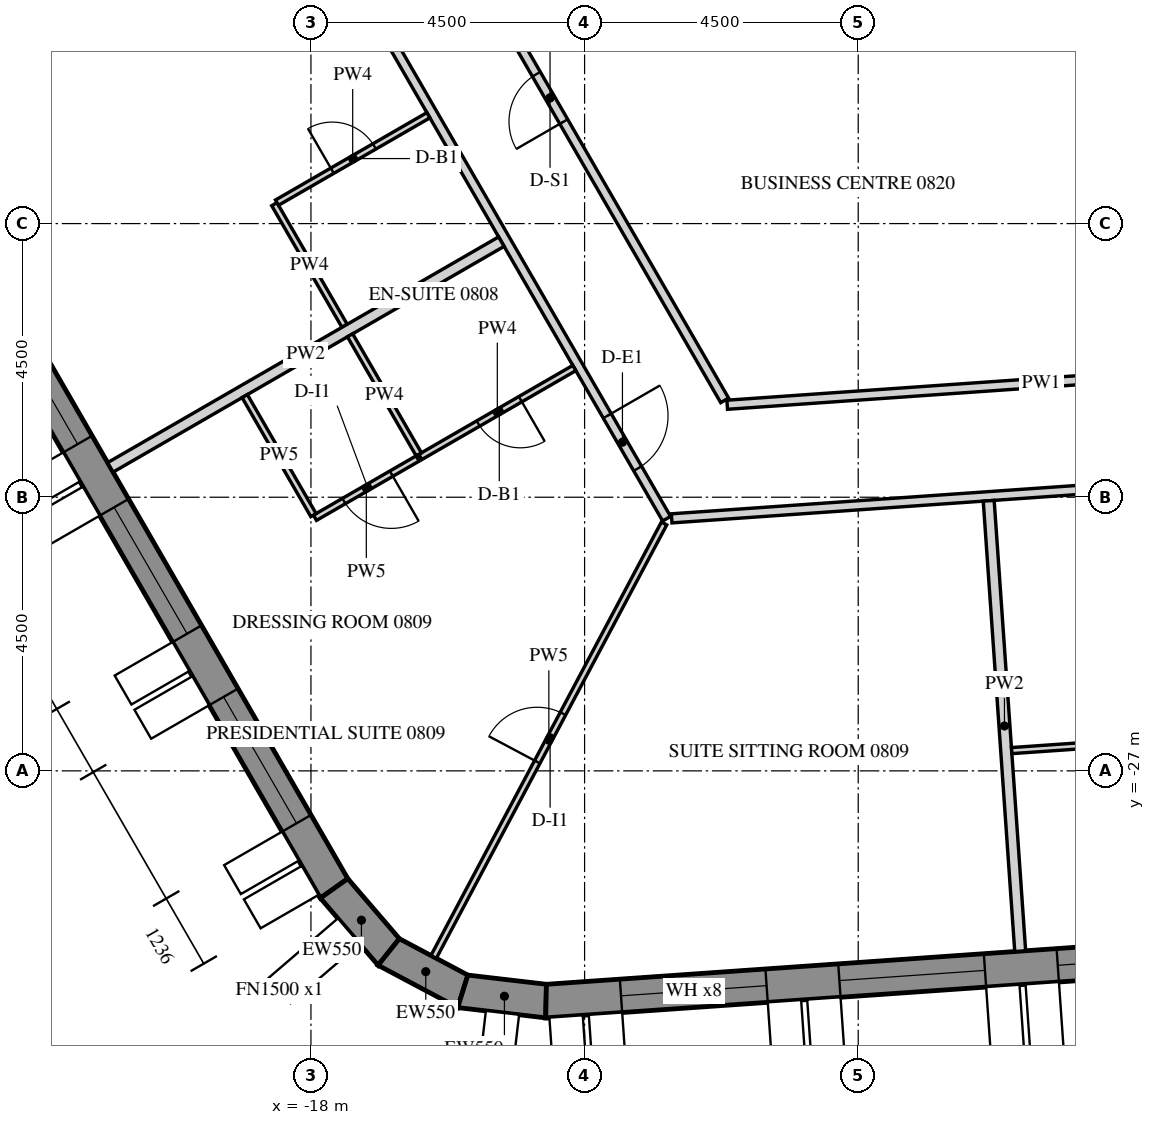
"""IFC4 building model, lengths in metres.
Left out: names, types, materials, properties, quantities, classifications, styles, units other than length and angle.
Written with IfcOpenShell. Run it as: python <this file> out.ifc"""

import sys

from ifc_helpers import new_model, si_unit, direction, frame, frame_2d, origin, place, context, subcontext, project, spatial, polyline, rectangle, outline, extrude, element, fill, save


model = new_model("IFC4")
c1 = context("Model", 3, precision=1e-05, world=origin(), true_north=direction((0.0, 1.0)))
c2 = subcontext(c1, "Body", "Model", "MODEL_VIEW")
j1 = project(units=[si_unit("LENGTHUNIT", "METRE"), si_unit("PLANEANGLEUNIT", "RADIAN")], contexts=[c1])
p1 = place(None, origin())
s1 = spatial("IfcSite", under=j1, at=p1, CompositionType="ELEMENT")
p2 = place(p1, origin())
s2 = spatial("IfcBuilding", under=s1, at=p2, CompositionType="ELEMENT")
p3 = place(p2, frame((0.0, 0.0, 111.6)))
s3 = spatial("IfcBuildingStorey", under=s2, at=p3, CompositionType="ELEMENT", Elevation=111.6)
p4 = place(p3, frame((-32.655, -2.89, -0.15), z_axis=(0.0, 0.0, 1.0), x_axis=(0.499997711317, -0.866026725152, 0.0)))
e1 = element("IfcWall", 1, at=p4, inside=s3, PredefinedType="SOLIDWALL", context=c2, shape_type="SweptSolid", body=[
    extrude(outline(polyline([(-0.022, -0.275), (30.097, -0.275), (30.045, 0.275), (0.022, 0.275), (-0.022, -0.275)])), origin(), (0.0, 0.0, 1.0), 3.9),
])
p5 = place(p4, frame((1.236, 0.0, 1.05)))
e2 = element("IfcOpeningElement", 2, at=p5, cuts=e1, PredefinedType="OPENING", context=c2, shape_type="SweptSolid", body=[
    extrude(rectangle(XDim=2.4, YDim=2.4, at=frame_2d((1.2, 1.2))), frame((0.0, 0.285, 0.0), z_axis=(0.0, -1.0, 0.0), x_axis=(1.0, 0.0, 0.0)), (0.0, 0.0, 1.0), 0.57),
])
p6 = place(p4, frame((4.835, 0.0, 1.05)))
e3 = element("IfcOpeningElement", 3, at=p6, cuts=e1, PredefinedType="OPENING", context=c2, shape_type="SweptSolid", body=[
    extrude(rectangle(XDim=2.4, YDim=2.4, at=frame_2d((1.2, 1.2))), frame((0.0, 0.285, 0.0), z_axis=(0.0, -1.0, 0.0), x_axis=(1.0, 0.0, 0.0)), (0.0, 0.0, 1.0), 0.57),
])
p7 = place(p4, frame((8.436, 0.0, 1.05)))
e4 = element("IfcOpeningElement", 4, at=p7, cuts=e1, PredefinedType="OPENING", context=c2, shape_type="SweptSolid", body=[
    extrude(rectangle(XDim=2.4, YDim=2.4, at=frame_2d((1.2, 1.2))), frame((0.0, 0.285, 0.0), z_axis=(0.0, -1.0, 0.0), x_axis=(1.0, 0.0, 0.0)), (0.0, 0.0, 1.0), 0.57),
])
p8 = place(p4, frame((12.035, 0.0, 1.05)))
e5 = element("IfcOpeningElement", 5, at=p8, cuts=e1, PredefinedType="OPENING", context=c2, shape_type="SweptSolid", body=[
    extrude(rectangle(XDim=2.4, YDim=2.4, at=frame_2d((1.2, 1.2))), frame((0.0, 0.285, 0.0), z_axis=(0.0, -1.0, 0.0), x_axis=(1.0, 0.0, 0.0)), (0.0, 0.0, 1.0), 0.57),
])
p9 = place(p4, frame((15.635, 0.0, 1.05)))
e6 = element("IfcOpeningElement", 6, at=p9, cuts=e1, PredefinedType="OPENING", context=c2, shape_type="SweptSolid", body=[
    extrude(rectangle(XDim=2.4, YDim=2.4, at=frame_2d((1.2, 1.2))), frame((0.0, 0.285, 0.0), z_axis=(0.0, -1.0, 0.0), x_axis=(1.0, 0.0, 0.0)), (0.0, 0.0, 1.0), 0.57),
])
p10 = place(p4, frame((19.236, 0.0, 1.05)))
e7 = element("IfcOpeningElement", 7, at=p10, cuts=e1, PredefinedType="OPENING", context=c2, shape_type="SweptSolid", body=[
    extrude(rectangle(XDim=2.4, YDim=2.4, at=frame_2d((1.2, 1.2))), frame((0.0, 0.285, 0.0), z_axis=(0.0, -1.0, 0.0), x_axis=(1.0, 0.0, 0.0)), (0.0, 0.0, 1.0), 0.57),
])
p11 = place(p4, frame((22.835, 0.0, 1.05)))
e8 = element("IfcOpeningElement", 8, at=p11, cuts=e1, PredefinedType="OPENING", context=c2, shape_type="SweptSolid", body=[
    extrude(rectangle(XDim=2.4, YDim=2.4, at=frame_2d((1.2, 1.2))), frame((0.0, 0.285, 0.0), z_axis=(0.0, -1.0, 0.0), x_axis=(1.0, 0.0, 0.0)), (0.0, 0.0, 1.0), 0.57),
])
p12 = place(p4, frame((26.436, 0.0, 1.05)))
e9 = element("IfcOpeningElement", 9, at=p12, cuts=e1, PredefinedType="OPENING", context=c2, shape_type="SweptSolid", body=[
    extrude(rectangle(XDim=2.4, YDim=2.4, at=frame_2d((1.2, 1.2))), frame((0.0, 0.285, 0.0), z_axis=(0.0, -1.0, 0.0), x_axis=(1.0, 0.0, 0.0)), (0.0, 0.0, 1.0), 0.57),
])
p13 = place(p3, frame((-17.619, -28.932, -0.15), z_axis=(0.0, 0.0, 1.0), x_axis=(0.651621950847, -0.758543890078, 0.0)))
e10 = element("IfcWall", 10, at=p13, inside=s3, PredefinedType="SOLIDWALL", context=c2, shape_type="SweptSolid", body=[
    extrude(outline(polyline([(-0.026, -0.275), (1.431, -0.275), (1.327, 0.275), (0.026, 0.275), (-0.026, -0.275)])), origin(), (0.0, 0.0, 1.0), 3.9),
])
p14 = place(p3, frame((-16.721, -29.979, -0.15), z_axis=(0.0, 0.0, 1.0), x_axis=(0.882994189209, -0.469383917304, 0.0)))
e11 = element("IfcWall", 11, at=p14, inside=s3, PredefinedType="SOLIDWALL", context=c2, shape_type="SweptSolid", body=[
    extrude(outline(polyline([(-0.052, -0.275), (1.431, -0.275), (1.327, 0.275), (0.052, 0.275), (-0.052, -0.275)])), origin(), (0.0, 0.0, 1.0), 3.9),
])
p15 = place(p3, frame((-15.503, -30.626, -0.15), z_axis=(0.0, 0.0, 1.0), x_axis=(0.993232537394, -0.11614269956, 0.0)))
e12 = element("IfcWall", 12, at=p15, inside=s3, PredefinedType="SOLIDWALL", context=c2, shape_type="SweptSolid", body=[
    extrude(outline(polyline([(-0.052, -0.275), (1.405, -0.275), (1.353, 0.275), (0.052, 0.275), (-0.052, -0.275)])), origin(), (0.0, 0.0, 1.0), 3.9),
])
p16 = place(p3, frame((-14.134, -30.786, -0.15), z_axis=(0.0, 0.0, 1.0), x_axis=(0.997564037441, 0.069756657061, 0.0)))
e13 = element("IfcWall", 13, at=p16, inside=s3, PredefinedType="SOLIDWALL", context=c2, shape_type="SweptSolid", body=[
    extrude(outline(polyline([(-0.026, -0.275), (30.094, -0.275), (30.049, 0.275), (0.026, 0.275), (-0.026, -0.275)])), origin(), (0.0, 0.0, 1.0), 3.9),
])
p17 = place(p16, frame((1.236, 0.0, 1.05)))
e14 = element("IfcOpeningElement", 14, at=p17, cuts=e13, PredefinedType="OPENING", context=c2, shape_type="SweptSolid", body=[
    extrude(rectangle(XDim=2.4, YDim=2.4, at=frame_2d((1.2, 1.2))), frame((0.0, 0.285, 0.0), z_axis=(0.0, -1.0, 0.0), x_axis=(1.0, 0.0, 0.0)), (0.0, 0.0, 1.0), 0.57),
])
p18 = place(p16, frame((4.835, 0.0, 1.05)))
e15 = element("IfcOpeningElement", 15, at=p18, cuts=e13, PredefinedType="OPENING", context=c2, shape_type="SweptSolid", body=[
    extrude(rectangle(XDim=2.4, YDim=2.4, at=frame_2d((1.2, 1.2))), frame((0.0, 0.285, 0.0), z_axis=(0.0, -1.0, 0.0), x_axis=(1.0, 0.0, 0.0)), (0.0, 0.0, 1.0), 0.57),
])
p19 = place(p16, frame((8.436, 0.0, 1.05)))
e16 = element("IfcOpeningElement", 16, at=p19, cuts=e13, PredefinedType="OPENING", context=c2, shape_type="SweptSolid", body=[
    extrude(rectangle(XDim=2.4, YDim=2.4, at=frame_2d((1.2, 1.2))), frame((0.0, 0.285, 0.0), z_axis=(0.0, -1.0, 0.0), x_axis=(1.0, 0.0, 0.0)), (0.0, 0.0, 1.0), 0.57),
])
p20 = place(p16, frame((12.035, 0.0, 1.05)))
e17 = element("IfcOpeningElement", 17, at=p20, cuts=e13, PredefinedType="OPENING", context=c2, shape_type="SweptSolid", body=[
    extrude(rectangle(XDim=2.4, YDim=2.4, at=frame_2d((1.2, 1.2))), frame((0.0, 0.285, 0.0), z_axis=(0.0, -1.0, 0.0), x_axis=(1.0, 0.0, 0.0)), (0.0, 0.0, 1.0), 0.57),
])
p21 = place(p16, frame((15.635, 0.0, 1.05)))
e18 = element("IfcOpeningElement", 18, at=p21, cuts=e13, PredefinedType="OPENING", context=c2, shape_type="SweptSolid", body=[
    extrude(rectangle(XDim=2.4, YDim=2.4, at=frame_2d((1.2, 1.2))), frame((0.0, 0.285, 0.0), z_axis=(0.0, -1.0, 0.0), x_axis=(1.0, 0.0, 0.0)), (0.0, 0.0, 1.0), 0.57),
])
p22 = place(p16, frame((19.236, 0.0, 1.05)))
e19 = element("IfcOpeningElement", 19, at=p22, cuts=e13, PredefinedType="OPENING", context=c2, shape_type="SweptSolid", body=[
    extrude(rectangle(XDim=2.4, YDim=2.4, at=frame_2d((1.2, 1.2))), frame((0.0, 0.285, 0.0), z_axis=(0.0, -1.0, 0.0), x_axis=(1.0, 0.0, 0.0)), (0.0, 0.0, 1.0), 0.57),
])
p23 = place(p16, frame((22.835, 0.0, 1.05)))
e20 = element("IfcOpeningElement", 20, at=p23, cuts=e13, PredefinedType="OPENING", context=c2, shape_type="SweptSolid", body=[
    extrude(rectangle(XDim=2.4, YDim=2.4, at=frame_2d((1.2, 1.2))), frame((0.0, 0.285, 0.0), z_axis=(0.0, -1.0, 0.0), x_axis=(1.0, 0.0, 0.0)), (0.0, 0.0, 1.0), 0.57),
])
p24 = place(p16, frame((26.436, 0.0, 1.05)))
e21 = element("IfcOpeningElement", 21, at=p24, cuts=e13, PredefinedType="OPENING", context=c2, shape_type="SweptSolid", body=[
    extrude(rectangle(XDim=2.4, YDim=2.4, at=frame_2d((1.2, 1.2))), frame((0.0, 0.285, 0.0), z_axis=(0.0, -1.0, 0.0), x_axis=(1.0, 0.0, 0.0)), (0.0, 0.0, 1.0), 0.57),
])
p25 = place(p3, frame((-24.09, -2.175, 0.0), z_axis=(0.0, 0.0, 1.0), x_axis=(0.499996832073, -0.86602723278, 0.0)))
e22 = element("IfcWall", 22, at=p25, inside=s3, PredefinedType="PARTITIONING", context=c2, shape_type="SweptSolid", body=[
    extrude(rectangle(XDim=23.877, YDim=0.15, at=frame_2d((11.938, 0.0))), origin(), (0.0, 0.0, 1.0), 2.988),
])
p26 = place(p25, frame((4.643, 0.0, 0.0)))
e23 = element("IfcOpeningElement", 23, at=p26, cuts=e22, PredefinedType="OPENING", context=c2, shape_type="SweptSolid", body=[
    extrude(rectangle(XDim=1.0, YDim=2.1, at=frame_2d((0.5, 1.05))), frame((0.0, 0.085, 0.0), z_axis=(0.0, -1.0, 0.0), x_axis=(1.0, 0.0, 0.0)), (0.0, 0.0, 1.0), 0.17),
])
p27 = place(p25, frame((11.472, 0.0, 0.0)))
e24 = element("IfcOpeningElement", 24, at=p27, cuts=e22, PredefinedType="OPENING", context=c2, shape_type="SweptSolid", body=[
    extrude(rectangle(XDim=1.0, YDim=2.1, at=frame_2d((0.5, 1.05))), frame((0.0, 0.085, 0.0), z_axis=(0.0, -1.0, 0.0), x_axis=(1.0, 0.0, 0.0)), (0.0, 0.0, 1.0), 0.17),
])
p28 = place(p25, frame((21.925, 0.0, 0.0)))
e25 = element("IfcOpeningElement", 25, at=p28, cuts=e22, PredefinedType="OPENING", context=c2, shape_type="SweptSolid", body=[
    extrude(rectangle(XDim=1.0, YDim=2.1, at=frame_2d((0.5, 1.05))), frame((0.0, 0.085, 0.0), z_axis=(0.0, -1.0, 0.0), x_axis=(1.0, 0.0, 0.0)), (0.0, 0.0, 1.0), 0.17),
])
p29 = place(p3, frame((-12.068, -22.847, 0.0), z_axis=(0.0, 0.0, 1.0), x_axis=(0.99756437486, 0.069751831595, 0.0)))
e26 = element("IfcWall", 26, at=p29, inside=s3, PredefinedType="PARTITIONING", context=c2, shape_type="SweptSolid", body=[
    extrude(rectangle(XDim=22.002, YDim=0.15, at=frame_2d((11.001, 0.0))), origin(), (0.0, 0.0, 1.0), 2.988),
])
p30 = place(p29, frame((10.621, 0.0, 0.0)))
e27 = element("IfcOpeningElement", 27, at=p30, cuts=e26, PredefinedType="OPENING", context=c2, shape_type="SweptSolid", body=[
    extrude(rectangle(XDim=1.0, YDim=2.1, at=frame_2d((0.5, 1.05))), frame((0.0, 0.085, 0.0), z_axis=(0.0, -1.0, 0.0), x_axis=(1.0, 0.0, 0.0)), (0.0, 0.0, 1.0), 0.17),
])
p31 = place(p29, frame((20.852, 0.0, 0.0)))
e28 = element("IfcOpeningElement", 28, at=p31, cuts=e26, PredefinedType="OPENING", context=c2, shape_type="SweptSolid", body=[
    extrude(rectangle(XDim=1.0, YDim=2.1, at=frame_2d((0.5, 1.05))), frame((0.0, 0.085, 0.0), z_axis=(0.0, -1.0, 0.0), x_axis=(1.0, 0.0, 0.0)), (0.0, 0.0, 1.0), 0.17),
])
p32 = place(p3, frame((-0.825, -20.257, 0.0), z_axis=(0.0, 0.0, 1.0), x_axis=(-0.9975635143, -0.069764137903, 0.0)))
e29 = element("IfcWall", 29, at=p32, inside=s3, PredefinedType="PARTITIONING", context=c2, shape_type="SweptSolid", body=[
    extrude(rectangle(XDim=10.355, YDim=0.15, at=frame_2d((5.177, 0.0))), origin(), (0.0, 0.0, 1.0), 2.988),
])
p33 = place(p3, frame((-11.197, -20.907, 0.0), z_axis=(0.0, 0.0, 1.0), x_axis=(-0.500004557924, 0.86602277225, 0.0)))
e30 = element("IfcWall", 30, at=p33, inside=s3, PredefinedType="PARTITIONING", context=c2, shape_type="SweptSolid", body=[
    extrude(rectangle(XDim=11.487, YDim=0.15, at=frame_2d((5.743, 0.0))), origin(), (0.0, 0.0, 1.0), 2.988),
])
p34 = place(p33, frame((5.293, 0.0, 0.0)))
e31 = element("IfcOpeningElement", 31, at=p34, cuts=e30, PredefinedType="OPENING", context=c2, shape_type="SweptSolid", body=[
    extrude(rectangle(XDim=0.9, YDim=2.1, at=frame_2d((0.45, 1.05))), frame((0.0, 0.085, 0.0), z_axis=(0.0, -1.0, 0.0), x_axis=(1.0, 0.0, 0.0)), (0.0, 0.0, 1.0), 0.17),
])
p35 = place(p3, frame((-17.447, -19.681, 0.0), z_axis=(0.0, 0.0, 1.0), x_axis=(-0.500015210774, 0.866016621662, 0.0)))
e32 = element("IfcWall", 32, at=p35, inside=s3, PredefinedType="PARTITIONING", context=c2, shape_type="SweptSolid", body=[
    extrude(rectangle(XDim=2.31, YDim=0.1, at=frame_2d((1.155, 0.0))), origin(), (0.0, 0.0, 1.0), 2.988),
])
p36 = place(p3, frame((-18.559, -17.656, 0.0), z_axis=(0.0, 0.0, 1.0), x_axis=(0.866039941686, 0.499974818771, 0.0)))
e33 = element("IfcWall", 33, at=p36, inside=s3, PredefinedType="PARTITIONING", context=c2, shape_type="SweptSolid", body=[
    extrude(rectangle(XDim=2.875, YDim=0.1, at=frame_2d((1.438, 0.0))), origin(), (0.0, 0.0, 1.0), 2.988),
])
p37 = place(p36, frame((1.05, 0.0, 0.0)))
e34 = element("IfcOpeningElement", 34, at=p37, cuts=e33, PredefinedType="OPENING", context=c2, shape_type="SweptSolid", body=[
    extrude(rectangle(XDim=0.8, YDim=2.1, at=frame_2d((0.4, 1.05))), frame((0.0, 0.06, 0.0), z_axis=(0.0, -1.0, 0.0), x_axis=(1.0, 0.0, 0.0)), (0.0, 0.0, 1.0), 0.12),
])
p38 = place(p3, frame((-21.299, -22.009, 0.0), z_axis=(0.0, 0.0, 1.0), x_axis=(0.866014745021, 0.500018461065, 0.0)))
e35 = element("IfcWall", 35, at=p38, inside=s3, PredefinedType="PARTITIONING", context=c2, shape_type="SweptSolid", body=[
    extrude(rectangle(XDim=7.425, YDim=0.18, at=frame_2d((3.712, 0.0))), origin(), (0.0, 0.0, 1.0), 2.988),
])
p39 = place(p3, frame((-13.669, -20.375, 0.0), z_axis=(0.0, 0.0, 1.0), x_axis=(-0.866046596414, -0.499963291492, 0.0)))
e36 = element("IfcWall", 36, at=p39, inside=s3, PredefinedType="PARTITIONING", context=c2, shape_type="SweptSolid", body=[
    extrude(rectangle(XDim=2.925, YDim=0.1, at=frame_2d((1.462, 0.0))), origin(), (0.0, 0.0, 1.0), 2.988),
])
p40 = place(p39, frame((1.025, 0.0, 0.0)))
e37 = element("IfcOpeningElement", 37, at=p40, cuts=e36, PredefinedType="OPENING", context=c2, shape_type="SweptSolid", body=[
    extrude(rectangle(XDim=0.8, YDim=2.1, at=frame_2d((0.4, 1.05))), frame((0.0, 0.06, 0.0), z_axis=(0.0, -1.0, 0.0), x_axis=(1.0, 0.0, 0.0)), (0.0, 0.0, 1.0), 0.12),
])
p41 = place(p3, frame((-16.245, -21.863, 0.0), z_axis=(0.0, 0.0, 1.0), x_axis=(-0.866000020948, -0.500043961785, 0.0)))
e38 = element("IfcWall", 38, at=p41, inside=s3, PredefinedType="PARTITIONING", context=c2, shape_type="SweptSolid", body=[
    extrude(rectangle(XDim=1.95, YDim=0.1, at=frame_2d((0.975, 0.0))), origin(), (0.0, 0.0, 1.0), 2.988),
])
p42 = place(p41, frame((0.5, 0.0, 0.0)))
e39 = element("IfcOpeningElement", 39, at=p42, cuts=e38, PredefinedType="OPENING", context=c2, shape_type="SweptSolid", body=[
    extrude(rectangle(XDim=0.9, YDim=2.1, at=frame_2d((0.45, 1.05))), frame((0.0, 0.06, 0.0), z_axis=(0.0, -1.0, 0.0), x_axis=(1.0, 0.0, 0.0)), (0.0, 0.0, 1.0), 0.12),
])
p43 = place(p3, frame((-17.959, -22.794, 0.0), z_axis=(0.0, 0.0, 1.0), x_axis=(-0.500031020067, 0.8660074936, 0.0)))
e40 = element("IfcWall", 40, at=p43, inside=s3, PredefinedType="PARTITIONING", context=c2, shape_type="SweptSolid", body=[
    extrude(rectangle(XDim=2.26, YDim=0.1, at=frame_2d((1.13, 0.0))), origin(), (0.0, 0.0, 1.0), 2.988),
])
p44 = place(p3, frame((-15.983, -30.059, 0.0), z_axis=(0.0, 0.0, 1.0), x_axis=(0.469476547643, 0.882944942346, 0.0)))
e41 = element("IfcWall", 41, at=p44, inside=s3, PredefinedType="PARTITIONING", context=c2, shape_type="SweptSolid", body=[
    extrude(rectangle(XDim=8.073, YDim=0.1, at=frame_2d((4.037, 0.0))), origin(), (0.0, 0.0, 1.0), 2.988),
])
p45 = place(p44, frame((3.631, 0.0, 0.0)))
e42 = element("IfcOpeningElement", 42, at=p45, cuts=e41, PredefinedType="OPENING", context=c2, shape_type="SweptSolid", body=[
    extrude(rectangle(XDim=0.9, YDim=2.1, at=frame_2d((0.45, 1.05))), frame((0.0, 0.06, 0.0), z_axis=(0.0, -1.0, 0.0), x_axis=(1.0, 0.0, 0.0)), (0.0, 0.0, 1.0), 0.12),
])
p46 = place(p3, frame((-17.357, -19.837, 0.0), z_axis=(0.0, 0.0, 1.0), x_axis=(0.49995000081, -0.866054268906, 0.0)))
e43 = element("IfcWall", 43, at=p46, inside=s3, PredefinedType="PARTITIONING", context=c2, shape_type="SweptSolid", body=[
    extrude(rectangle(XDim=2.26, YDim=0.1, at=frame_2d((1.13, 0.0))), origin(), (0.0, 0.0, 1.0), 2.988),
])
p47 = place(p3, frame((-6.336, -29.965, 0.0), z_axis=(0.0, 0.0, 1.0), x_axis=(-0.06977252161, 0.997562927954, 0.0)))
e44 = element("IfcWall", 44, at=p47, inside=s3, PredefinedType="PARTITIONING", context=c2, shape_type="SweptSolid", body=[
    extrude(rectangle(XDim=7.425, YDim=0.18, at=frame_2d((3.712, 0.0))), origin(), (0.0, 0.0, 1.0), 2.988),
])
p48 = place(p3, frame((-6.477, -26.667, 0.0), z_axis=(0.0, 0.0, 1.0), x_axis=(0.997565277642, 0.069738919141, 0.0)))
e45 = element("IfcWall", 45, at=p48, inside=s3, PredefinedType="PARTITIONING", context=c2, shape_type="SweptSolid", body=[
    extrude(rectangle(XDim=7.11, YDim=0.1, at=frame_2d((3.555, 0.0))), origin(), (0.0, 0.0, 1.0), 2.988),
])
p49 = place(p48, frame((3.06, 0.0, 0.0)))
e46 = element("IfcOpeningElement", 46, at=p49, cuts=e45, PredefinedType="OPENING", context=c2, shape_type="SweptSolid", body=[
    extrude(rectangle(XDim=0.9, YDim=2.1, at=frame_2d((0.45, 1.05))), frame((0.0, 0.06, 0.0), z_axis=(0.0, -1.0, 0.0), x_axis=(1.0, 0.0, 0.0)), (0.0, 0.0, 1.0), 0.12),
])
p50 = place(p10, frame((0.0, 0.205, 0.0)))
e47 = element("IfcWindow", 47, at=p50, inside=s3, PartitioningType="DOUBLE_PANEL_VERTICAL", PredefinedType="WINDOW", context=c2, shape_type="SweptSolid", body=[
    extrude(rectangle(XDim=2.4, YDim=2.4, at=frame_2d((1.2, 1.2))), frame((0.0, 0.03, 0.0), z_axis=(0.0, -1.0, 0.0), x_axis=(1.0, 0.0, 0.0)), (0.0, 0.0, 1.0), 0.06),
])
fill(e7, e47)
p51 = place(p11, frame((0.0, 0.205, 0.0)))
e48 = element("IfcWindow", 48, at=p51, inside=s3, PartitioningType="DOUBLE_PANEL_VERTICAL", PredefinedType="WINDOW", context=c2, shape_type="SweptSolid", body=[
    extrude(rectangle(XDim=2.4, YDim=2.4, at=frame_2d((1.2, 1.2))), frame((0.0, 0.03, 0.0), z_axis=(0.0, -1.0, 0.0), x_axis=(1.0, 0.0, 0.0)), (0.0, 0.0, 1.0), 0.06),
])
fill(e8, e48)
p52 = place(p12, frame((0.0, 0.205, 0.0)))
e49 = element("IfcWindow", 49, at=p52, inside=s3, PartitioningType="DOUBLE_PANEL_VERTICAL", PredefinedType="WINDOW", context=c2, shape_type="SweptSolid", body=[
    extrude(rectangle(XDim=2.4, YDim=2.4, at=frame_2d((1.2, 1.2))), frame((0.0, 0.03, 0.0), z_axis=(0.0, -1.0, 0.0), x_axis=(1.0, 0.0, 0.0)), (0.0, 0.0, 1.0), 0.06),
])
fill(e9, e49)
p53 = place(p17, frame((0.0, 0.205, 0.0)))
e50 = element("IfcWindow", 50, at=p53, inside=s3, PartitioningType="DOUBLE_PANEL_VERTICAL", PredefinedType="WINDOW", context=c2, shape_type="SweptSolid", body=[
    extrude(rectangle(XDim=2.4, YDim=2.4, at=frame_2d((1.2, 1.2))), frame((0.0, 0.03, 0.0), z_axis=(0.0, -1.0, 0.0), x_axis=(1.0, 0.0, 0.0)), (0.0, 0.0, 1.0), 0.06),
])
fill(e14, e50)
p54 = place(p18, frame((0.0, 0.205, 0.0)))
e51 = element("IfcWindow", 51, at=p54, inside=s3, PartitioningType="DOUBLE_PANEL_VERTICAL", PredefinedType="WINDOW", context=c2, shape_type="SweptSolid", body=[
    extrude(rectangle(XDim=2.4, YDim=2.4, at=frame_2d((1.2, 1.2))), frame((0.0, 0.03, 0.0), z_axis=(0.0, -1.0, 0.0), x_axis=(1.0, 0.0, 0.0)), (0.0, 0.0, 1.0), 0.06),
])
fill(e15, e51)
p55 = place(p19, frame((0.0, 0.205, 0.0)))
e52 = element("IfcWindow", 52, at=p55, inside=s3, PartitioningType="DOUBLE_PANEL_VERTICAL", PredefinedType="WINDOW", context=c2, shape_type="SweptSolid", body=[
    extrude(rectangle(XDim=2.4, YDim=2.4, at=frame_2d((1.2, 1.2))), frame((0.0, 0.03, 0.0), z_axis=(0.0, -1.0, 0.0), x_axis=(1.0, 0.0, 0.0)), (0.0, 0.0, 1.0), 0.06),
])
fill(e16, e52)
p56 = place(p37, origin())
e53 = element("IfcDoor", 53, at=p56, inside=s3, OperationType="SINGLE_SWING_LEFT", PredefinedType="DOOR", context=c2, shape_type="SweptSolid", body=[
    extrude(rectangle(XDim=0.8, YDim=2.1, at=frame_2d((0.4, 1.05))), frame((0.0, 0.025, 0.0), z_axis=(0.0, -1.0, 0.0), x_axis=(1.0, 0.0, 0.0)), (0.0, 0.0, 1.0), 0.05),
])
fill(e34, e53)
p57 = place(p28, origin())
e54 = element("IfcDoor", 54, at=p57, inside=s3, OperationType="SINGLE_SWING_RIGHT", PredefinedType="DOOR", context=c2, shape_type="SweptSolid", body=[
    extrude(rectangle(XDim=1.0, YDim=2.1, at=frame_2d((0.5, 1.05))), frame((0.0, 0.025, 0.0), z_axis=(0.0, -1.0, 0.0), x_axis=(1.0, 0.0, 0.0)), (0.0, 0.0, 1.0), 0.05),
])
fill(e25, e54)
p58 = place(p40, origin())
e55 = element("IfcDoor", 55, at=p58, inside=s3, OperationType="SINGLE_SWING_RIGHT", PredefinedType="DOOR", context=c2, shape_type="SweptSolid", body=[
    extrude(rectangle(XDim=0.8, YDim=2.1, at=frame_2d((0.4, 1.05))), frame((0.0, 0.025, 0.0), z_axis=(0.0, -1.0, 0.0), x_axis=(1.0, 0.0, 0.0)), (0.0, 0.0, 1.0), 0.05),
])
fill(e37, e55)
p59 = place(p42, origin())
e56 = element("IfcDoor", 56, at=p59, inside=s3, OperationType="SINGLE_SWING_RIGHT", PredefinedType="DOOR", context=c2, shape_type="SweptSolid", body=[
    extrude(rectangle(XDim=0.9, YDim=2.1, at=frame_2d((0.45, 1.05))), frame((0.0, 0.025, 0.0), z_axis=(0.0, -1.0, 0.0), x_axis=(1.0, 0.0, 0.0)), (0.0, 0.0, 1.0), 0.05),
])
fill(e39, e56)
p60 = place(p45, origin())
e57 = element("IfcDoor", 57, at=p60, inside=s3, OperationType="SINGLE_SWING_LEFT", PredefinedType="DOOR", context=c2, shape_type="SweptSolid", body=[
    extrude(rectangle(XDim=0.9, YDim=2.1, at=frame_2d((0.45, 1.05))), frame((0.0, 0.025, 0.0), z_axis=(0.0, -1.0, 0.0), x_axis=(1.0, 0.0, 0.0)), (0.0, 0.0, 1.0), 0.05),
])
fill(e42, e57)
p61 = place(p34, origin())
e58 = element("IfcDoor", 58, at=p61, inside=s3, OperationType="SINGLE_SWING_RIGHT", PredefinedType="DOOR", context=c2, shape_type="SweptSolid", body=[
    extrude(rectangle(XDim=0.9, YDim=2.1, at=frame_2d((0.45, 1.05))), frame((0.0, 0.025, 0.0), z_axis=(0.0, -1.0, 0.0), x_axis=(1.0, 0.0, 0.0)), (0.0, 0.0, 1.0), 0.05),
])
fill(e31, e58)
save(model, sys.argv[1])
